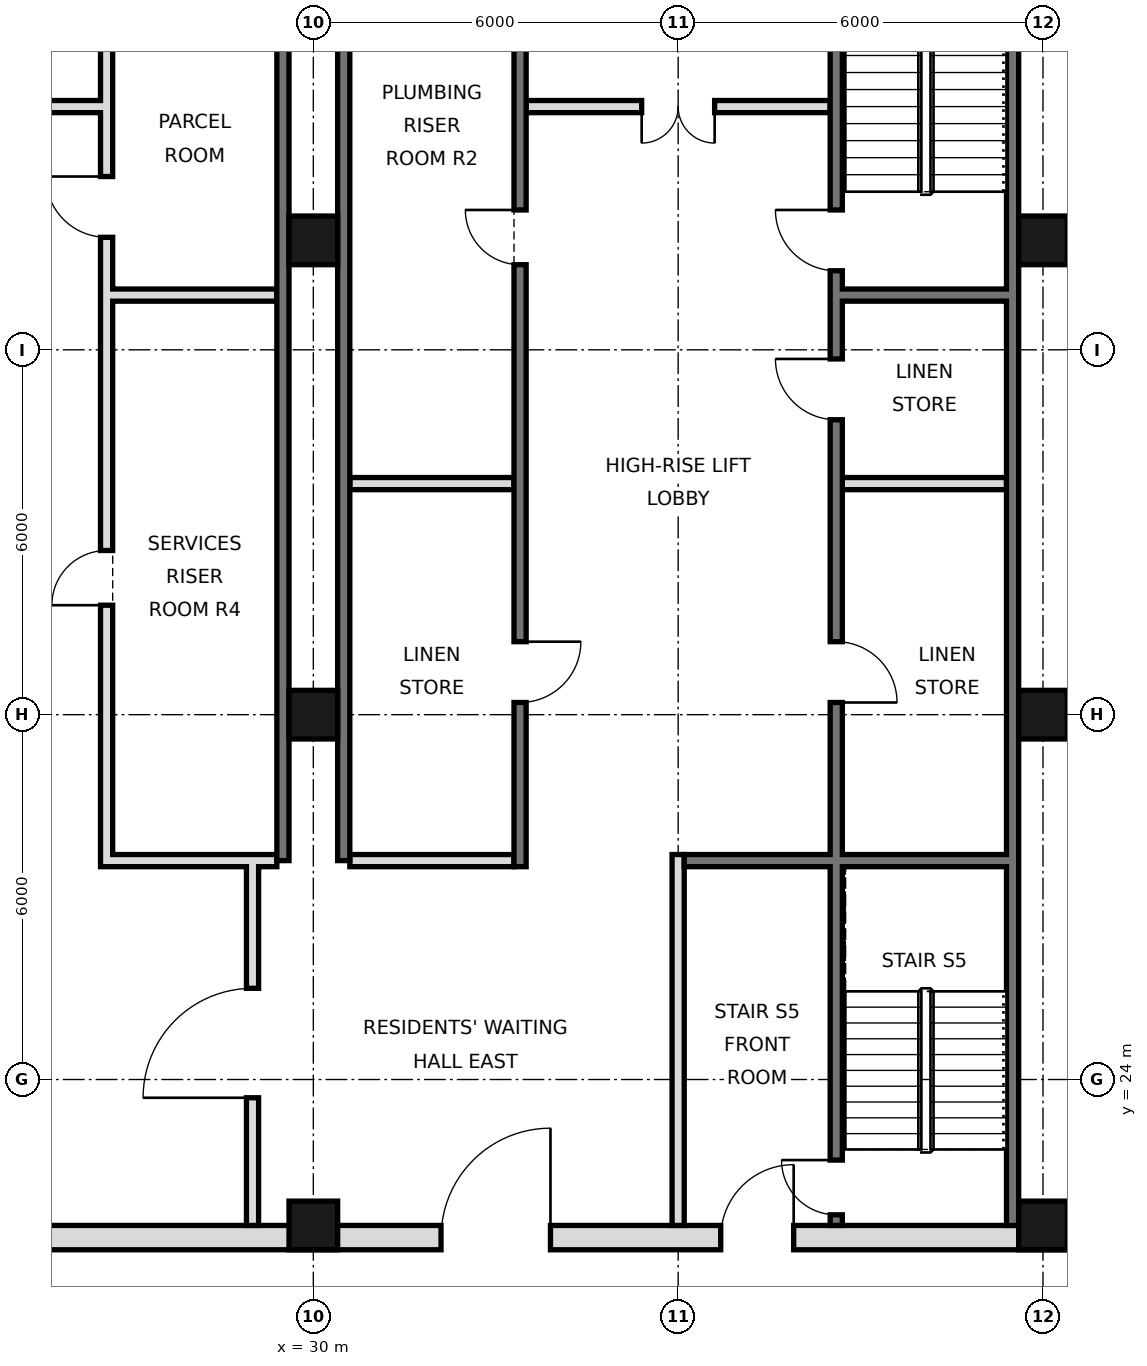
"""IFC4 building model, lengths in metres.
Left out: names, types, materials, properties, quantities, classifications, styles, units other than length and angle.
Written with IfcOpenShell. Run it as: python <this file> out.ifc"""

import sys

from ifc_helpers import new_model, si_unit, direction, frame, frame_2d, origin, origin_2d, place, context, subcontext, project, spatial, rectangle, hollow_rectangle, extrude, element, fill, save


model = new_model("IFC4")
c1 = context("Model", 3, precision=1e-05, world=origin(), true_north=direction((0.0, 1.0)))
c2 = subcontext(c1, "Body", "Model", "MODEL_VIEW")
j1 = project(units=[si_unit("LENGTHUNIT", "METRE"), si_unit("PLANEANGLEUNIT", "RADIAN")], contexts=[c1])
p1 = place(None, origin())
s1 = spatial("IfcSite", under=j1, at=p1, CompositionType="ELEMENT")
p2 = place(p1, origin())
s2 = spatial("IfcBuilding", under=s1, at=p2, CompositionType="ELEMENT")
p3 = place(p2, frame((0.0, 0.0, 60.6)))
s3 = spatial("IfcBuildingStorey", under=s2, at=p3, CompositionType="ELEMENT", Elevation=60.6)
for number, where, z_axis, x_axis in (
    (1, (30.0, 21.6, 0.0), (0.0, 0.0, 1.0), (1.0, 0.0, 0.0)),
    (2, (30.0, 30.0, 0.0), (0.0, 0.0, 1.0), (1.0, 0.0, 0.0)),
    (3, (30.0, 37.8, 0.0), (0.0, 0.0, 1.0), (1.0, 0.0, 0.0)),
    (4, (42.0, 21.6, 0.0), (0.0, 0.0, 1.0), (1.0, 0.0, 0.0)),
    (5, (42.0, 30.0, 0.0), (0.0, 0.0, 1.0), (1.0, 0.0, 0.0)),
    (6, (42.0, 37.8, 0.0), (0.0, 0.0, 1.0), (1.0, 0.0, 0.0)),
):
    element("IfcColumn", number, at=place(p3, frame(where, z_axis=z_axis, x_axis=x_axis)), inside=s3, PredefinedType="COLUMN", context=c2, shape_type="SweptSolid", body=[
        extrude(hollow_rectangle(XDim=0.8, YDim=0.8, WallThickness=0.06, at=origin_2d()), origin(), (0.0, 0.0, 1.0), 3.6),
    ])
p4 = place(p3, frame((41.5, 21.6, 0.0), z_axis=(0.0, 0.0, 1.0), x_axis=(0.0, 1.0, 0.0)))
e7 = element("IfcWall", 7, at=p4, inside=s3, PredefinedType="SOLIDWALL", context=c2, shape_type="SweptSolid", body=[
    extrude(rectangle(XDim=23.5, YDim=0.2, at=frame_2d((11.75, 0.0))), origin(), (0.0, 0.0, 1.0), 3.42),
])
for number, where, z_axis, x_axis in (
    (8, (29.5, 27.6, 0.0), (0.0, 0.0, 1.0), (0.0, 1.0, 0.0)),
    (9, (30.5, 27.6, 0.0), (0.0, 0.0, 1.0), (0.0, 1.0, 0.0)),
):
    element("IfcWall", number, at=place(p3, frame(where, z_axis=z_axis, x_axis=x_axis)), inside=s3, PredefinedType="SOLIDWALL", context=c2, shape_type="SweptSolid", body=[
        extrude(rectangle(XDim=17.5, YDim=0.2, at=frame_2d((8.75, 0.0))), origin(), (0.0, 0.0, 1.0), 3.42),
    ])
p5 = place(p3, frame((5.6, 21.4, 0.0), z_axis=(0.0, 0.0, 1.0), x_axis=(1.0, 0.0, 0.0)))
e10 = element("IfcWall", 10, at=p5, inside=s3, PredefinedType="SOLIDWALL", context=c2, shape_type="SweptSolid", body=[
    extrude(rectangle(XDim=36.8, YDim=0.4, at=frame_2d((18.4, 0.0))), origin(), (0.0, 0.0, 1.0), 3.42),
])
p6 = place(p5, frame((8.5, 0.0, 0.0)))
e11 = element("IfcOpeningElement", 11, at=p6, cuts=e10, PredefinedType="OPENING", context=c2, shape_type="SweptSolid", body=[
    extrude(rectangle(XDim=1.8, YDim=2.1, at=frame_2d((0.9, 1.05))), frame((0.0, 0.21, 0.0), z_axis=(0.0, -1.0, 0.0), x_axis=(1.0, 0.0, 0.0)), (0.0, 0.0, 1.0), 0.42),
])
p7 = place(p5, frame((17.5, 0.0, 0.0)))
e12 = element("IfcOpeningElement", 12, at=p7, cuts=e10, PredefinedType="OPENING", context=c2, shape_type="SweptSolid", body=[
    extrude(rectangle(XDim=1.8, YDim=2.1, at=frame_2d((0.9, 1.05))), frame((0.0, 0.21, 0.0), z_axis=(0.0, -1.0, 0.0), x_axis=(1.0, 0.0, 0.0)), (0.0, 0.0, 1.0), 0.42),
])
p8 = place(p5, frame((26.5, 0.0, 0.0)))
e13 = element("IfcOpeningElement", 13, at=p8, cuts=e10, PredefinedType="OPENING", context=c2, shape_type="SweptSolid", body=[
    extrude(rectangle(XDim=1.8, YDim=2.1, at=frame_2d((0.9, 1.05))), frame((0.0, 0.21, 0.0), z_axis=(0.0, -1.0, 0.0), x_axis=(1.0, 0.0, 0.0)), (0.0, 0.0, 1.0), 0.42),
])
p9 = place(p5, frame((4.5, 0.0, 0.0)))
e14 = element("IfcOpeningElement", 14, at=p9, cuts=e10, PredefinedType="OPENING", context=c2, shape_type="SweptSolid", body=[
    extrude(rectangle(XDim=1.2, YDim=2.1, at=frame_2d((0.6, 1.05))), frame((0.0, 0.21, 0.0), z_axis=(0.0, -1.0, 0.0), x_axis=(1.0, 0.0, 0.0)), (0.0, 0.0, 1.0), 0.42),
])
p10 = place(p5, frame((31.1, 0.0, 0.0)))
e15 = element("IfcOpeningElement", 15, at=p10, cuts=e10, PredefinedType="OPENING", context=c2, shape_type="SweptSolid", body=[
    extrude(rectangle(XDim=1.2, YDim=2.1, at=frame_2d((0.6, 1.05))), frame((0.0, 0.21, 0.0), z_axis=(0.0, -1.0, 0.0), x_axis=(1.0, 0.0, 0.0)), (0.0, 0.0, 1.0), 0.42),
])
p11 = place(p3, frame((29.0, 21.6, 0.0), z_axis=(0.0, 0.0, 1.0), x_axis=(0.0, 1.0, 0.0)))
e16 = element("IfcWall", 16, at=p11, inside=s3, PredefinedType="PARTITIONING", context=c2, shape_type="SweptSolid", body=[
    extrude(rectangle(XDim=6.0, YDim=0.2, at=frame_2d((3.0, 0.0))), origin(), (0.0, 0.0, 1.0), 3.42),
])
p12 = place(p11, frame((2.1, 0.0, 0.0)))
e17 = element("IfcOpeningElement", 17, at=p12, cuts=e16, PredefinedType="OPENING", context=c2, shape_type="SweptSolid", body=[
    extrude(rectangle(XDim=1.8, YDim=2.1, at=frame_2d((0.9, 1.05))), frame((0.0, 0.11, 0.0), z_axis=(0.0, -1.0, 0.0), x_axis=(1.0, 0.0, 0.0)), (0.0, 0.0, 1.0), 0.22),
])
p13 = place(p3, frame((26.6, 27.5, 0.0), z_axis=(0.0, 0.0, 1.0), x_axis=(0.0, 1.0, 0.0)))
e18 = element("IfcWall", 18, at=p13, inside=s3, PredefinedType="SOLIDWALL", context=c2, shape_type="SweptSolid", body=[
    extrude(rectangle(XDim=17.5, YDim=0.2, at=frame_2d((8.75, 0.0))), origin(), (0.0, 0.0, 1.0), 3.42),
])
p14 = place(p13, frame((4.3, 0.0, 0.0)))
e19 = element("IfcOpeningElement", 19, at=p14, cuts=e18, PredefinedType="OPENING", context=c2, shape_type="SweptSolid", body=[
    extrude(rectangle(XDim=0.9, YDim=2.1, at=frame_2d((0.45, 1.05))), frame((0.0, 0.11, 0.0), z_axis=(0.0, -1.0, 0.0), x_axis=(1.0, 0.0, 0.0)), (0.0, 0.0, 1.0), 0.22),
])
p15 = place(p13, frame((10.35, 0.0, 0.0)))
e20 = element("IfcOpeningElement", 20, at=p15, cuts=e18, PredefinedType="OPENING", context=c2, shape_type="SweptSolid", body=[
    extrude(rectangle(XDim=1.0, YDim=2.1, at=frame_2d((0.5, 1.05))), frame((0.0, 0.11, 0.0), z_axis=(0.0, -1.0, 0.0), x_axis=(1.0, 0.0, 0.0)), (0.0, 0.0, 1.0), 0.22),
])
p16 = place(p13, frame((15.475, 0.0, 0.0)))
e21 = element("IfcOpeningElement", 21, at=p16, cuts=e18, PredefinedType="OPENING", context=c2, shape_type="SweptSolid", body=[
    extrude(rectangle(XDim=1.0, YDim=2.1, at=frame_2d((0.5, 1.05))), frame((0.0, 0.11, 0.0), z_axis=(0.0, -1.0, 0.0), x_axis=(1.0, 0.0, 0.0)), (0.0, 0.0, 1.0), 0.22),
])
p17 = place(p3, frame((33.4, 27.5, 0.0), z_axis=(0.0, 0.0, 1.0), x_axis=(0.0, 1.0, 0.0)))
e22 = element("IfcWall", 22, at=p17, inside=s3, PredefinedType="SOLIDWALL", context=c2, shape_type="SweptSolid", body=[
    extrude(rectangle(XDim=17.5, YDim=0.2, at=frame_2d((8.75, 0.0))), origin(), (0.0, 0.0, 1.0), 3.42),
])
p18 = place(p17, frame((15.4, 0.0, 0.0)))
e23 = element("IfcOpeningElement", 23, at=p18, cuts=e22, PredefinedType="OPENING", context=c2, shape_type="SweptSolid", body=[
    extrude(rectangle(XDim=1.1, YDim=2.1, at=frame_2d((0.55, 1.05))), frame((0.0, 0.11, 0.0), z_axis=(0.0, -1.0, 0.0), x_axis=(1.0, 0.0, 0.0)), (0.0, 0.0, 1.0), 0.22),
])
p19 = place(p17, frame((2.7, 0.0, 0.0)))
e24 = element("IfcOpeningElement", 24, at=p19, cuts=e22, PredefinedType="OPENING", context=c2, shape_type="SweptSolid", body=[
    extrude(rectangle(XDim=1.0, YDim=2.1, at=frame_2d((0.5, 1.05))), frame((0.0, 0.11, 0.0), z_axis=(0.0, -1.0, 0.0), x_axis=(1.0, 0.0, 0.0)), (0.0, 0.0, 1.0), 0.22),
])
p20 = place(p17, frame((9.9, 0.0, 0.0)))
e25 = element("IfcOpeningElement", 25, at=p20, cuts=e22, PredefinedType="OPENING", context=c2, shape_type="SweptSolid", body=[
    extrude(rectangle(XDim=0.9, YDim=2.1, at=frame_2d((0.45, 1.05))), frame((0.0, 0.11, 0.0), z_axis=(0.0, -1.0, 0.0), x_axis=(1.0, 0.0, 0.0)), (0.0, 0.0, 1.0), 0.22),
])
p21 = place(p3, frame((36.0, 21.6, 0.0), z_axis=(0.0, 0.0, 1.0), x_axis=(0.0, 1.0, 0.0)))
e26 = element("IfcWall", 26, at=p21, inside=s3, PredefinedType="PARTITIONING", context=c2, shape_type="SweptSolid", body=[
    extrude(rectangle(XDim=6.1, YDim=0.2, at=frame_2d((3.05, 0.0))), origin(), (0.0, 0.0, 1.0), 3.42),
])
p22 = place(p3, frame((38.6, 21.6, 0.0), z_axis=(0.0, 0.0, 1.0), x_axis=(0.0, 1.0, 0.0)))
e27 = element("IfcWall", 27, at=p22, inside=s3, PredefinedType="SOLIDWALL", context=c2, shape_type="SweptSolid", body=[
    extrude(rectangle(XDim=23.4, YDim=0.2, at=frame_2d((11.7, 0.0))), origin(), (0.0, 0.0, 1.0), 3.42),
])
p23 = place(p22, frame((8.6, 0.0, 0.0)))
e28 = element("IfcOpeningElement", 28, at=p23, cuts=e27, PredefinedType="OPENING", context=c2, shape_type="SweptSolid", body=[
    extrude(rectangle(XDim=1.0, YDim=2.1, at=frame_2d((0.5, 1.05))), frame((0.0, 0.11, 0.0), z_axis=(0.0, -1.0, 0.0), x_axis=(1.0, 0.0, 0.0)), (0.0, 0.0, 1.0), 0.22),
])
p24 = place(p22, frame((13.25, 0.0, 0.0)))
e29 = element("IfcOpeningElement", 29, at=p24, cuts=e27, PredefinedType="OPENING", context=c2, shape_type="SweptSolid", body=[
    extrude(rectangle(XDim=1.0, YDim=2.1, at=frame_2d((0.5, 1.05))), frame((0.0, 0.11, 0.0), z_axis=(0.0, -1.0, 0.0), x_axis=(1.0, 0.0, 0.0)), (0.0, 0.0, 1.0), 0.22),
])
p25 = place(p22, frame((15.7, 0.0, 0.0)))
e30 = element("IfcOpeningElement", 30, at=p25, cuts=e27, PredefinedType="OPENING", context=c2, shape_type="SweptSolid", body=[
    extrude(rectangle(XDim=1.0, YDim=2.1, at=frame_2d((0.5, 1.05))), frame((0.0, 0.11, 0.0), z_axis=(0.0, -1.0, 0.0), x_axis=(1.0, 0.0, 0.0)), (0.0, 0.0, 1.0), 0.22),
])
p26 = place(p22, frame((0.175, 0.0, 0.0)))
e31 = element("IfcOpeningElement", 31, at=p26, cuts=e27, PredefinedType="OPENING", context=c2, shape_type="SweptSolid", body=[
    extrude(rectangle(XDim=0.9, YDim=2.1, at=frame_2d((0.45, 1.05))), frame((0.0, 0.11, 0.0), z_axis=(0.0, -1.0, 0.0), x_axis=(1.0, 0.0, 0.0)), (0.0, 0.0, 1.0), 0.22),
])
p27 = place(p3, frame((26.7, 27.6, 0.0), z_axis=(0.0, 0.0, 1.0), x_axis=(1.0, 0.0, 0.0)))
e32 = element("IfcWall", 32, at=p27, inside=s3, PredefinedType="SOLIDWALL", context=c2, shape_type="SweptSolid", body=[
    extrude(rectangle(XDim=2.7, YDim=0.2, at=frame_2d((1.35, 0.0))), origin(), (0.0, 0.0, 1.0), 3.42),
])
p28 = place(p3, frame((30.6, 27.6, 0.0), z_axis=(0.0, 0.0, 1.0), x_axis=(1.0, 0.0, 0.0)))
e33 = element("IfcWall", 33, at=p28, inside=s3, PredefinedType="PARTITIONING", context=c2, shape_type="SweptSolid", body=[
    extrude(rectangle(XDim=2.7, YDim=0.2, at=frame_2d((1.35, 0.0))), origin(), (0.0, 0.0, 1.0), 3.42),
])
p29 = place(p3, frame((36.1, 27.6, 0.0), z_axis=(0.0, 0.0, 1.0), x_axis=(1.0, 0.0, 0.0)))
e34 = element("IfcWall", 34, at=p29, inside=s3, PredefinedType="SOLIDWALL", context=c2, shape_type="SweptSolid", body=[
    extrude(rectangle(XDim=5.3, YDim=0.2, at=frame_2d((2.65, 0.0))), origin(), (0.0, 0.0, 1.0), 3.42),
])
p30 = place(p3, frame((30.6, 33.8, 0.0), z_axis=(0.0, 0.0, 1.0), x_axis=(1.0, 0.0, 0.0)))
e35 = element("IfcWall", 35, at=p30, inside=s3, PredefinedType="SOLIDWALL", context=c2, shape_type="SweptSolid", body=[
    extrude(rectangle(XDim=2.7, YDim=0.2, at=frame_2d((1.35, 0.0))), origin(), (0.0, 0.0, 1.0), 3.42),
])
p31 = place(p3, frame((38.7, 33.8, 0.0), z_axis=(0.0, 0.0, 1.0), x_axis=(1.0, 0.0, 0.0)))
e36 = element("IfcWall", 36, at=p31, inside=s3, PredefinedType="PARTITIONING", context=c2, shape_type="SweptSolid", body=[
    extrude(rectangle(XDim=2.7, YDim=0.2, at=frame_2d((1.35, 0.0))), origin(), (0.0, 0.0, 1.0), 3.42),
])
for number, where, z_axis, x_axis in (
    (37, (26.7, 36.9, 0.0), (0.0, 0.0, 1.0), (1.0, 0.0, 0.0)),
    (38, (38.7, 36.9, 0.0), (0.0, 0.0, 1.0), (1.0, 0.0, 0.0)),
):
    element("IfcWall", number, at=place(p3, frame(where, z_axis=z_axis, x_axis=x_axis)), inside=s3, PredefinedType="SOLIDWALL", context=c2, shape_type="SweptSolid", body=[
        extrude(rectangle(XDim=2.7, YDim=0.2, at=frame_2d((1.35, 0.0))), origin(), (0.0, 0.0, 1.0), 3.42),
    ])
p32 = place(p3, frame((21.5, 40.0, 0.0), z_axis=(0.0, 0.0, 1.0), x_axis=(1.0, 0.0, 0.0)))
e39 = element("IfcWall", 39, at=p32, inside=s3, PredefinedType="PARTITIONING", context=c2, shape_type="SweptSolid", body=[
    extrude(rectangle(XDim=5.0, YDim=0.2, at=frame_2d((2.5, 0.0))), origin(), (0.0, 0.0, 1.0), 3.42),
])
p33 = place(p32, frame((1.9, 0.0, 0.0)))
e40 = element("IfcOpeningElement", 40, at=p33, cuts=e39, PredefinedType="OPENING", context=c2, shape_type="SweptSolid", body=[
    extrude(rectangle(XDim=1.2, YDim=2.1, at=frame_2d((0.6, 1.05))), frame((0.0, 0.11, 0.0), z_axis=(0.0, -1.0, 0.0), x_axis=(1.0, 0.0, 0.0)), (0.0, 0.0, 1.0), 0.22),
])
p34 = place(p3, frame((33.5, 40.0, 0.0), z_axis=(0.0, 0.0, 1.0), x_axis=(1.0, 0.0, 0.0)))
e41 = element("IfcWall", 41, at=p34, inside=s3, PredefinedType="PARTITIONING", context=c2, shape_type="SweptSolid", body=[
    extrude(rectangle(XDim=5.0, YDim=0.2, at=frame_2d((2.5, 0.0))), origin(), (0.0, 0.0, 1.0), 3.42),
])
p35 = place(p34, frame((1.9, 0.0, 0.0)))
e42 = element("IfcOpeningElement", 42, at=p35, cuts=e41, PredefinedType="OPENING", context=c2, shape_type="SweptSolid", body=[
    extrude(rectangle(XDim=1.2, YDim=2.1, at=frame_2d((0.6, 1.05))), frame((0.0, 0.11, 0.0), z_axis=(0.0, -1.0, 0.0), x_axis=(1.0, 0.0, 0.0)), (0.0, 0.0, 1.0), 0.22),
])
p36 = place(p12, origin())
e43 = element("IfcDoor", 43, at=p36, inside=s3, OperationType="SINGLE_SWING_LEFT", PredefinedType="DOOR", context=c2, shape_type="SweptSolid", body=[
    extrude(rectangle(XDim=1.8, YDim=2.1, at=frame_2d((0.9, 1.05))), frame((0.0, 0.025, 0.0), z_axis=(0.0, -1.0, 0.0), x_axis=(1.0, 0.0, 0.0)), (0.0, 0.0, 1.0), 0.05),
])
fill(e17, e43)
p37 = place(p8, frame((1.8, 0.0, 0.0), z_axis=(0.0, 0.0, 1.0), x_axis=(-1.0, 0.0, 0.0)))
e44 = element("IfcDoor", 44, at=p37, inside=s3, OperationType="SINGLE_SWING_LEFT", PredefinedType="DOOR", context=c2, shape_type="SweptSolid", body=[
    extrude(rectangle(XDim=1.8, YDim=2.1, at=frame_2d((0.9, 1.05))), frame((0.0, 0.025, 0.0), z_axis=(0.0, -1.0, 0.0), x_axis=(1.0, 0.0, 0.0)), (0.0, 0.0, 1.0), 0.05),
])
fill(e13, e44)
p38 = place(p10, frame((1.2, 0.0, 0.0), z_axis=(0.0, 0.0, 1.0), x_axis=(-1.0, 0.0, 0.0)))
e45 = element("IfcDoor", 45, at=p38, inside=s3, OperationType="SINGLE_SWING_LEFT", PredefinedType="DOOR", context=c2, shape_type="SweptSolid", body=[
    extrude(rectangle(XDim=1.2, YDim=2.1, at=frame_2d((0.6, 1.05))), frame((0.0, 0.025, 0.0), z_axis=(0.0, -1.0, 0.0), x_axis=(1.0, 0.0, 0.0)), (0.0, 0.0, 1.0), 0.05),
])
fill(e15, e45)
p39 = place(p35, frame((1.2, 0.0, 0.0), z_axis=(0.0, 0.0, 1.0), x_axis=(-1.0, 0.0, 0.0)))
e46 = element("IfcDoor", 46, at=p39, inside=s3, OperationType="DOUBLE_DOOR_SINGLE_SWING", PredefinedType="DOOR", context=c2, shape_type="SweptSolid", body=[
    extrude(rectangle(XDim=1.2, YDim=2.1, at=frame_2d((0.6, 1.05))), frame((0.0, 0.025, 0.0), z_axis=(0.0, -1.0, 0.0), x_axis=(1.0, 0.0, 0.0)), (0.0, 0.0, 1.0), 0.05),
])
fill(e42, e46)
p40 = place(p23, frame((1.0, 0.0, 0.0), z_axis=(0.0, 0.0, 1.0), x_axis=(-1.0, 0.0, 0.0)))
e47 = element("IfcDoor", 47, at=p40, inside=s3, OperationType="SINGLE_SWING_RIGHT", PredefinedType="DOOR", context=c2, shape_type="SweptSolid", body=[
    extrude(rectangle(XDim=1.0, YDim=2.1, at=frame_2d((0.5, 1.05))), frame((0.0, 0.025, 0.0), z_axis=(0.0, -1.0, 0.0), x_axis=(1.0, 0.0, 0.0)), (0.0, 0.0, 1.0), 0.05),
])
fill(e28, e47)
p41 = place(p24, frame((1.0, 0.0, 0.0), z_axis=(0.0, 0.0, 1.0), x_axis=(-1.0, 0.0, 0.0)))
e48 = element("IfcDoor", 48, at=p41, inside=s3, OperationType="SINGLE_SWING_LEFT", PredefinedType="DOOR", context=c2, shape_type="SweptSolid", body=[
    extrude(rectangle(XDim=1.0, YDim=2.1, at=frame_2d((0.5, 1.05))), frame((0.0, 0.025, 0.0), z_axis=(0.0, -1.0, 0.0), x_axis=(1.0, 0.0, 0.0)), (0.0, 0.0, 1.0), 0.05),
])
fill(e29, e48)
p42 = place(p19, origin())
e49 = element("IfcDoor", 49, at=p42, inside=s3, OperationType="SINGLE_SWING_RIGHT", PredefinedType="DOOR", context=c2, shape_type="SweptSolid", body=[
    extrude(rectangle(XDim=1.0, YDim=2.1, at=frame_2d((0.5, 1.05))), frame((0.0, 0.025, 0.0), z_axis=(0.0, -1.0, 0.0), x_axis=(1.0, 0.0, 0.0)), (0.0, 0.0, 1.0), 0.05),
])
fill(e24, e49)
p43 = place(p25, frame((1.0, 0.0, 0.0), z_axis=(0.0, 0.0, 1.0), x_axis=(-1.0, 0.0, 0.0)))
e50 = element("IfcDoor", 50, at=p43, inside=s3, OperationType="SINGLE_SWING_LEFT", PredefinedType="DOOR", context=c2, shape_type="SweptSolid", body=[
    extrude(rectangle(XDim=1.0, YDim=2.1, at=frame_2d((0.5, 1.05))), frame((0.0, 0.025, 0.0), z_axis=(0.0, -1.0, 0.0), x_axis=(1.0, 0.0, 0.0)), (0.0, 0.0, 1.0), 0.05),
])
fill(e30, e50)
p44 = place(p26, frame((0.9, 0.0, 0.0), z_axis=(0.0, 0.0, 1.0), x_axis=(-1.0, 0.0, 0.0)))
e51 = element("IfcDoor", 51, at=p44, inside=s3, OperationType="SINGLE_SWING_LEFT", PredefinedType="DOOR", context=c2, shape_type="SweptSolid", body=[
    extrude(rectangle(XDim=0.9, YDim=2.1, at=frame_2d((0.45, 1.05))), frame((0.0, 0.025, 0.0), z_axis=(0.0, -1.0, 0.0), x_axis=(1.0, 0.0, 0.0)), (0.0, 0.0, 1.0), 0.05),
])
fill(e31, e51)
p45 = place(p20, frame((0.9, 0.0, 0.0), z_axis=(0.0, 0.0, 1.0), x_axis=(-1.0, 0.0, 0.0)))
e52 = element("IfcDoor", 52, at=p45, inside=s3, OperationType="SINGLE_SWING_LEFT", PredefinedType="DOOR", context=c2, shape_type="SweptSolid", body=[
    extrude(rectangle(XDim=0.9, YDim=2.1, at=frame_2d((0.45, 1.05))), frame((0.0, 0.025, 0.0), z_axis=(0.0, -1.0, 0.0), x_axis=(1.0, 0.0, 0.0)), (0.0, 0.0, 1.0), 0.05),
])
fill(e25, e52)
p46 = place(p14, origin())
e53 = element("IfcDoor", 53, at=p46, inside=s3, OperationType="SINGLE_SWING_LEFT", PredefinedType="DOOR", context=c2, shape_type="SweptSolid", body=[
    extrude(rectangle(XDim=0.9, YDim=2.1, at=frame_2d((0.45, 1.05))), frame((0.0, 0.025, 0.0), z_axis=(0.0, -1.0, 0.0), x_axis=(1.0, 0.0, 0.0)), (0.0, 0.0, 1.0), 0.05),
])
fill(e19, e53)
p47 = place(p15, frame((1.0, 0.0, 0.0), z_axis=(0.0, 0.0, 1.0), x_axis=(-1.0, 0.0, 0.0)))
e54 = element("IfcDoor", 54, at=p47, inside=s3, OperationType="SINGLE_SWING_LEFT", PredefinedType="DOOR", context=c2, shape_type="SweptSolid", body=[
    extrude(rectangle(XDim=1.0, YDim=2.1, at=frame_2d((0.5, 1.05))), frame((0.0, 0.025, 0.0), z_axis=(0.0, -1.0, 0.0), x_axis=(1.0, 0.0, 0.0)), (0.0, 0.0, 1.0), 0.05),
])
fill(e20, e54)
save(model, sys.argv[1])
